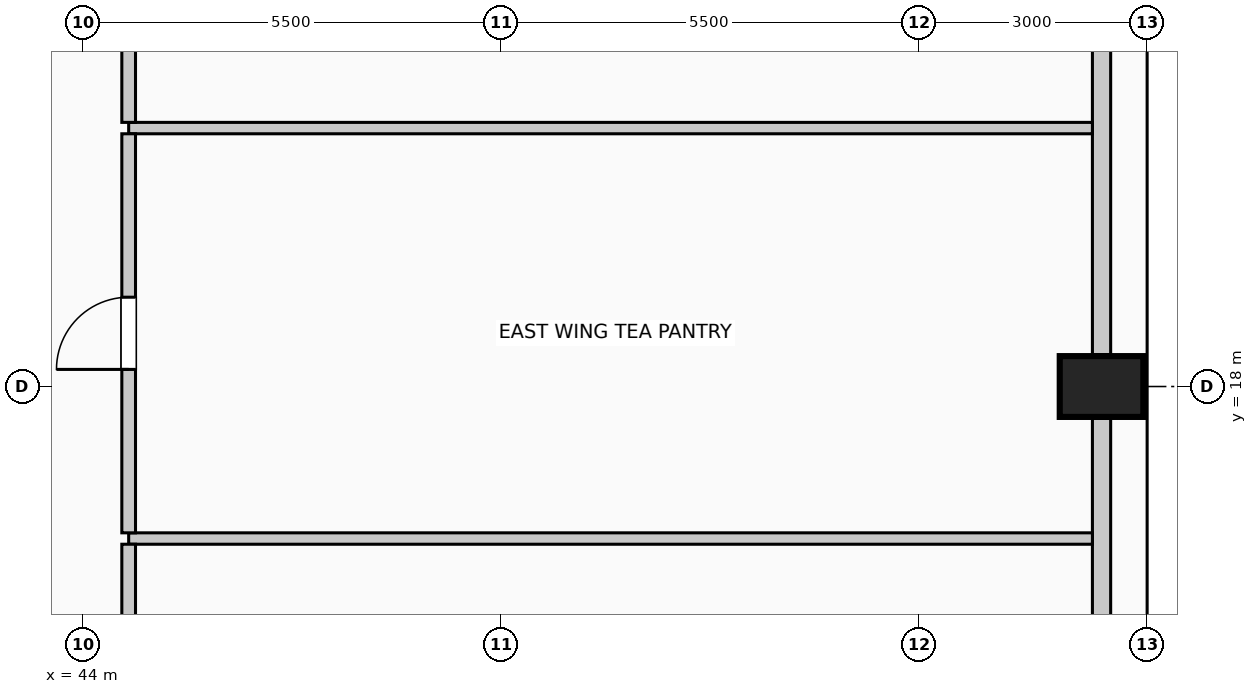
"""IFC4 building model, lengths in metres.
Left out: names, types, materials, properties, quantities, classifications, styles, units other than length and angle.
Written with IfcOpenShell. Run it as: python <this file> out.ifc"""

import sys

from ifc_helpers import new_model, si_unit, direction, frame, frame_2d, origin, origin_2d, place, context, subcontext, project, spatial, rectangle, extrude, element, fill, save


model = new_model("IFC4")
c1 = context("Model", 3, precision=1e-05, world=origin(), true_north=direction((0.0, 1.0)))
c2 = subcontext(c1, "Body", "Model", "MODEL_VIEW")
j1 = project(units=[si_unit("LENGTHUNIT", "METRE"), si_unit("PLANEANGLEUNIT", "RADIAN")], contexts=[c1])
p1 = place(None, origin())
s1 = spatial("IfcSite", under=j1, at=p1, CompositionType="ELEMENT")
p2 = place(p1, origin())
s2 = spatial("IfcBuilding", under=s1, at=p2, CompositionType="ELEMENT")
p3 = place(p2, frame((0.0, 0.0, 182.6)))
s3 = spatial("IfcBuildingStorey", under=s2, at=p3, CompositionType="ELEMENT", Elevation=182.6)
p4 = place(p3, frame((57.4, 18.0, 0.0), z_axis=(0.0, 0.0, 1.0), x_axis=(0.0, 1.0, 0.0)))
e1 = element("IfcColumn", 1, at=p4, inside=s3, PredefinedType="COLUMN", context=c2, shape_type="SweptSolid", body=[
    extrude(rectangle(XDim=0.8, YDim=1.1, at=origin_2d()), origin(), (0.0, 0.0, 1.0), 4.0),
])
p5 = place(p3, frame((57.4, 17.58, 0.0), z_axis=(0.0, 0.0, 1.0), x_axis=(0.0, -1.0, 0.0)))
e2 = element("IfcWall", 2, at=p5, inside=s3, PredefinedType="SOLIDWALL", context=c2, shape_type="SweptSolid", body=[
    extrude(rectangle(XDim=7.16, YDim=0.24, at=frame_2d((3.58, 0.0))), origin(), (0.0, 0.0, 1.0), 3.0),
])
p6 = place(p5, frame((4.04, 0.0, 0.42)))
e3 = element("IfcOpeningElement", 3, at=p6, cuts=e2, PredefinedType="OPENING", context=c2, shape_type="SweptSolid", body=[
    extrude(rectangle(XDim=2.2, YDim=1.95, at=frame_2d((1.1, 0.975))), frame((0.0, 0.13, 0.0), z_axis=(0.0, -1.0, 0.0), x_axis=(1.0, 0.0, 0.0)), (0.0, 0.0, 1.0), 0.26),
])
p7 = place(p3, frame((57.4, 25.58, 0.0), z_axis=(0.0, 0.0, 1.0), x_axis=(0.0, -1.0, 0.0)))
e4 = element("IfcWall", 4, at=p7, inside=s3, PredefinedType="SOLIDWALL", context=c2, shape_type="SweptSolid", body=[
    extrude(rectangle(XDim=7.16, YDim=0.24, at=frame_2d((3.58, 0.0))), origin(), (0.0, 0.0, 1.0), 3.0),
])
for number, where, z_axis, x_axis in (
    (5, (44.6, 16.0, 0.0), (0.0, 0.0, 1.0), (1.0, 0.0, 0.0)),
    (6, (44.6, 21.4, 0.0), (0.0, 0.0, 1.0), (1.0, 0.0, 0.0)),
):
    element("IfcWall", number, at=place(p3, frame(where, z_axis=z_axis, x_axis=x_axis)), inside=s3, PredefinedType="PARTITIONING", context=c2, shape_type="SweptSolid", body=[
        extrude(rectangle(XDim=12.68, YDim=0.15, at=frame_2d((6.34, 0.0))), origin(), (0.0, 0.0, 1.0), 3.75),
    ])
p8 = place(p3, frame((44.6, 6.89, 0.0), z_axis=(0.0, 0.0, 1.0), x_axis=(0.0, 1.0, 0.0)))
e7 = element("IfcWall", 7, at=p8, inside=s3, PredefinedType="PARTITIONING", context=c2, shape_type="SweptSolid", body=[
    extrude(rectangle(XDim=9.035, YDim=0.18, at=frame_2d((4.518, 0.0))), origin(), (0.0, 0.0, 1.0), 3.75),
])
p9 = place(p8, frame((3.992, 0.0, 0.0)))
e8 = element("IfcOpeningElement", 8, at=p9, cuts=e7, PredefinedType="OPENING", context=c2, shape_type="SweptSolid", body=[
    extrude(rectangle(XDim=1.05, YDim=2.15, at=frame_2d((0.525, 1.075))), frame((0.0, 0.1, 0.0), z_axis=(0.0, -1.0, 0.0), x_axis=(1.0, 0.0, 0.0)), (0.0, 0.0, 1.0), 0.2),
])
p10 = place(p3, frame((44.6, 16.075, 0.0), z_axis=(0.0, 0.0, 1.0), x_axis=(0.0, 1.0, 0.0)))
e9 = element("IfcWall", 9, at=p10, inside=s3, PredefinedType="PARTITIONING", context=c2, shape_type="SweptSolid", body=[
    extrude(rectangle(XDim=5.25, YDim=0.18, at=frame_2d((2.625, 0.0))), origin(), (0.0, 0.0, 1.0), 3.75),
])
p11 = place(p10, frame((2.15, 0.0, 0.0)))
e10 = element("IfcOpeningElement", 10, at=p11, cuts=e9, PredefinedType="OPENING", context=c2, shape_type="SweptSolid", body=[
    extrude(rectangle(XDim=0.95, YDim=2.15, at=frame_2d((0.475, 1.075))), frame((0.0, 0.1, 0.0), z_axis=(0.0, -1.0, 0.0), x_axis=(1.0, 0.0, 0.0)), (0.0, 0.0, 1.0), 0.2),
])
p12 = place(p3, frame((44.6, 21.475, 0.0), z_axis=(0.0, 0.0, 1.0), x_axis=(0.0, 1.0, 0.0)))
e11 = element("IfcWall", 11, at=p12, inside=s3, PredefinedType="PARTITIONING", context=c2, shape_type="SweptSolid", body=[
    extrude(rectangle(XDim=5.25, YDim=0.18, at=frame_2d((2.625, 0.0))), origin(), (0.0, 0.0, 1.0), 3.75),
])
p13 = place(p12, frame((2.1, 0.0, 0.0)))
e12 = element("IfcOpeningElement", 12, at=p13, cuts=e11, PredefinedType="OPENING", context=c2, shape_type="SweptSolid", body=[
    extrude(rectangle(XDim=1.05, YDim=2.15, at=frame_2d((0.525, 1.075))), frame((0.0, 0.1, 0.0), z_axis=(0.0, -1.0, 0.0), x_axis=(1.0, 0.0, 0.0)), (0.0, 0.0, 1.0), 0.2),
])
p14 = place(p11, origin())
e13 = element("IfcDoor", 13, at=p14, inside=s3, OperationType="SINGLE_SWING_LEFT", PredefinedType="DOOR", context=c2, shape_type="SweptSolid", body=[
    extrude(rectangle(XDim=0.95, YDim=2.15, at=frame_2d((0.475, 1.075))), frame((0.0, 0.025, 0.0), z_axis=(0.0, -1.0, 0.0), x_axis=(1.0, 0.0, 0.0)), (0.0, 0.0, 1.0), 0.05),
])
fill(e10, e13)
save(model, sys.argv[1])
